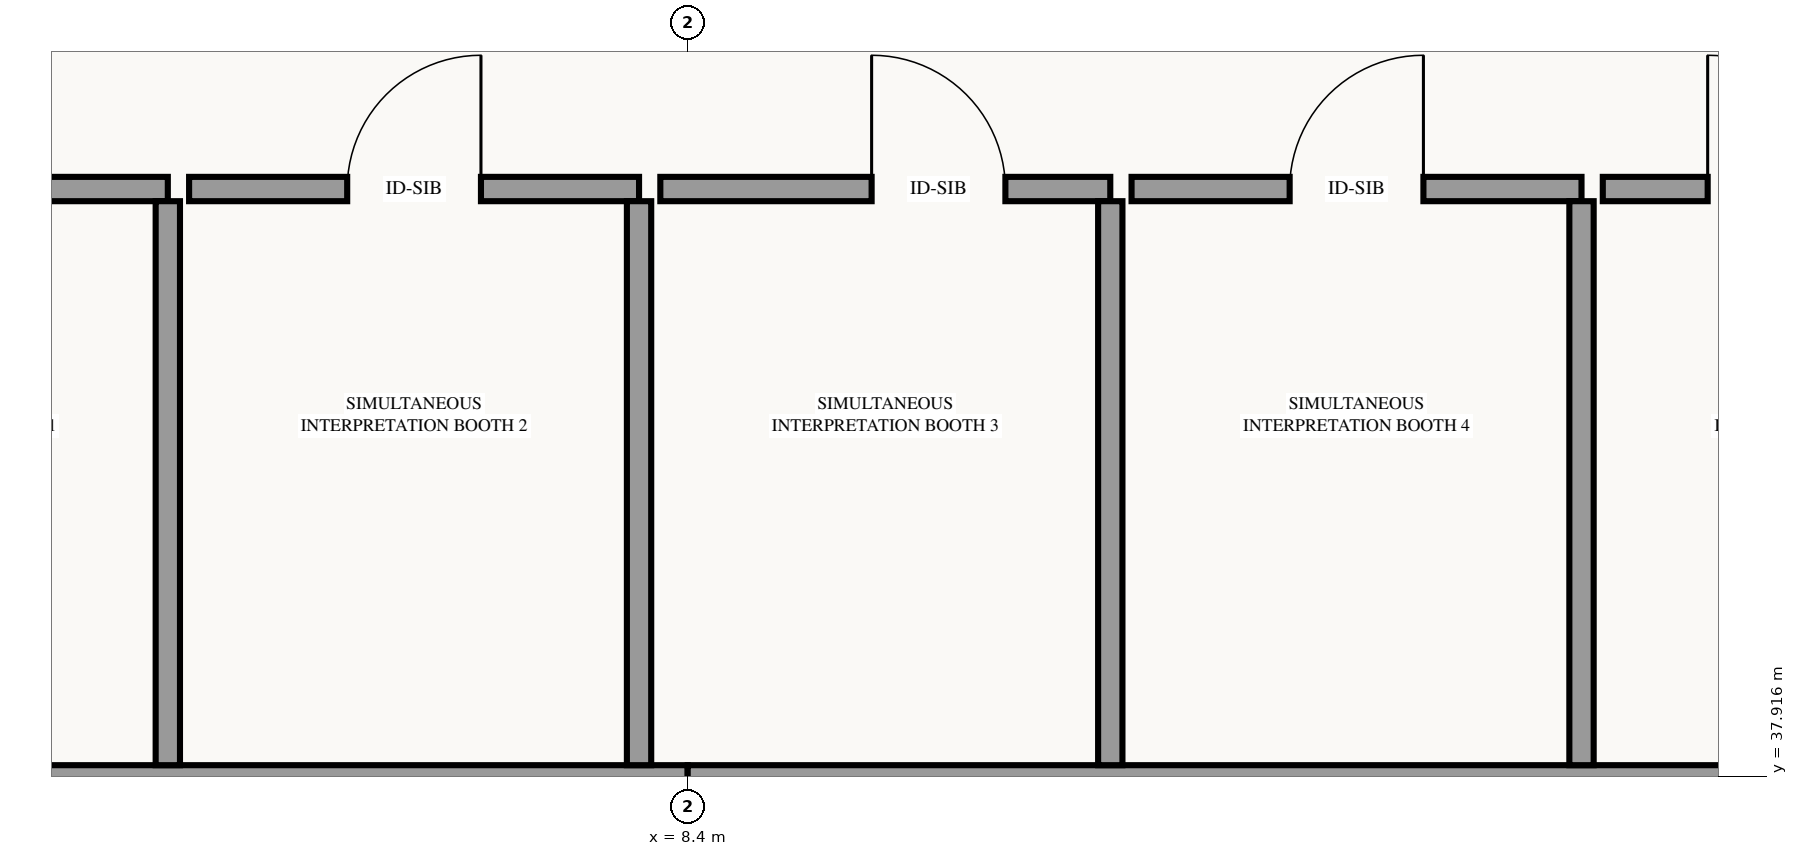
"""IFC4 building model, lengths in metres.
Left out: names, types, materials, properties, quantities, classifications, styles, units other than length and angle.
Written with IfcOpenShell. Run it as: python <this file> out.ifc"""

import sys

from ifc_helpers import new_model, si_unit, direction, frame, frame_2d, origin, origin_2d, place, context, subcontext, project, spatial, rectangle, extrude, element, fill, save


model = new_model("IFC4")
c1 = context("Model", 3, precision=1e-05, world=origin(), true_north=direction((0.0, 1.0)))
c2 = subcontext(c1, "Body", "Model", "MODEL_VIEW")
j1 = project(units=[si_unit("LENGTHUNIT", "METRE"), si_unit("PLANEANGLEUNIT", "RADIAN")], contexts=[c1])
p1 = place(None, origin())
s1 = spatial("IfcSite", under=j1, at=p1, CompositionType="ELEMENT")
p2 = place(p1, origin())
s2 = spatial("IfcBuilding", under=s1, at=p2, CompositionType="ELEMENT")
p3 = place(p2, frame((0.0, 0.0, 5.4)))
s3 = spatial("IfcBuildingStorey", under=s2, at=p3, CompositionType="ELEMENT", Elevation=5.4)
p4 = place(p3, frame((8.4, 37.8, 0.0), z_axis=(0.0, 0.0, 1.0), x_axis=(1.0, 0.0, 0.0)))
e1 = element("IfcColumn", 1, at=p4, inside=s3, PredefinedType="COLUMN", context=c2, shape_type="SweptSolid", body=[
    extrude(rectangle(XDim=0.75, YDim=0.75, at=origin_2d()), origin(), (0.0, 0.0, 1.0), 4.5),
])
p5 = place(p3, frame((0.0, 37.8, 0.0), z_axis=(0.0, 0.0, 1.0), x_axis=(1.0, 0.0, 0.0)))
e2 = element("IfcWall", 2, at=p5, inside=s3, PredefinedType="STANDARD", context=c2, shape_type="SweptSolid", body=[
    extrude(rectangle(XDim=8.4, YDim=0.38, at=frame_2d((4.2, 0.0))), origin(), (0.0, 0.0, 1.0), 3.993),
])
p6 = place(p3, frame((8.4, 37.8, 0.0), z_axis=(0.0, 0.0, 1.0), x_axis=(1.0, 0.0, 0.0)))
e3 = element("IfcWall", 3, at=p6, inside=s3, PredefinedType="STANDARD", context=c2, shape_type="SweptSolid", body=[
    extrude(rectangle(XDim=8.4, YDim=0.38, at=frame_2d((4.2, 0.0))), origin(), (0.0, 0.0, 1.0), 3.556),
])
p7 = place(p3, frame((2.02, 41.78, 0.0), z_axis=(0.0, 0.0, 1.0), x_axis=(1.0, 0.0, 0.0)))
e4 = element("IfcWall", 4, at=p7, inside=s3, PredefinedType="PARTITIONING", context=c2, shape_type="SweptSolid", body=[
    extrude(rectangle(XDim=2.96, YDim=0.16, at=frame_2d((1.48, 0.0))), origin(), (0.0, 0.0, 1.0), 4.235),
])
p8 = place(p7, frame((1.04, 0.0, 0.0)))
e5 = element("IfcOpeningElement", 5, at=p8, cuts=e4, PredefinedType="OPENING", context=c2, shape_type="SweptSolid", body=[
    extrude(rectangle(XDim=0.88, YDim=2.05, at=frame_2d((0.44, 1.025))), frame((0.0, 0.09, 0.0), z_axis=(0.0, -1.0, 0.0), x_axis=(1.0, 0.0, 0.0)), (0.0, 0.0, 1.0), 0.18),
])
p9 = place(p3, frame((4.98, 37.99, 0.0), z_axis=(0.0, 0.0, 1.0), x_axis=(0.0, 1.0, 0.0)))
e6 = element("IfcWall", 6, at=p9, inside=s3, PredefinedType="PARTITIONING", context=c2, shape_type="SweptSolid", body=[
    extrude(rectangle(XDim=3.71, YDim=0.16, at=frame_2d((1.855, 0.0))), origin(), (0.0, 0.0, 1.0), 4.235),
])
p10 = place(p3, frame((5.12, 41.78, 0.0), z_axis=(0.0, 0.0, 1.0), x_axis=(1.0, 0.0, 0.0)))
e7 = element("IfcWall", 7, at=p10, inside=s3, PredefinedType="PARTITIONING", context=c2, shape_type="SweptSolid", body=[
    extrude(rectangle(XDim=2.96, YDim=0.16, at=frame_2d((1.48, 0.0))), origin(), (0.0, 0.0, 1.0), 4.235),
])
p11 = place(p10, frame((1.04, 0.0, 0.0)))
e8 = element("IfcOpeningElement", 8, at=p11, cuts=e7, PredefinedType="OPENING", context=c2, shape_type="SweptSolid", body=[
    extrude(rectangle(XDim=0.88, YDim=2.05, at=frame_2d((0.44, 1.025))), frame((0.0, 0.09, 0.0), z_axis=(0.0, -1.0, 0.0), x_axis=(1.0, 0.0, 0.0)), (0.0, 0.0, 1.0), 0.18),
])
p12 = place(p3, frame((8.08, 37.99, 0.0), z_axis=(0.0, 0.0, 1.0), x_axis=(0.0, 1.0, 0.0)))
e9 = element("IfcWall", 9, at=p12, inside=s3, PredefinedType="PARTITIONING", context=c2, shape_type="SweptSolid", body=[
    extrude(rectangle(XDim=3.71, YDim=0.16, at=frame_2d((1.855, 0.0))), origin(), (0.0, 0.0, 1.0), 4.235),
])
p13 = place(p3, frame((8.22, 41.78, 0.0), z_axis=(0.0, 0.0, 1.0), x_axis=(1.0, 0.0, 0.0)))
e10 = element("IfcWall", 10, at=p13, inside=s3, PredefinedType="PARTITIONING", context=c2, shape_type="SweptSolid", body=[
    extrude(rectangle(XDim=2.96, YDim=0.16, at=frame_2d((1.48, 0.0))), origin(), (0.0, 0.0, 1.0), 4.235),
])
p14 = place(p13, frame((1.39, 0.0, 0.0)))
e11 = element("IfcOpeningElement", 11, at=p14, cuts=e10, PredefinedType="OPENING", context=c2, shape_type="SweptSolid", body=[
    extrude(rectangle(XDim=0.88, YDim=2.05, at=frame_2d((0.44, 1.025))), frame((0.0, 0.09, 0.0), z_axis=(0.0, -1.0, 0.0), x_axis=(1.0, 0.0, 0.0)), (0.0, 0.0, 1.0), 0.18),
])
p15 = place(p3, frame((11.18, 37.99, 0.0), z_axis=(0.0, 0.0, 1.0), x_axis=(0.0, 1.0, 0.0)))
e12 = element("IfcWall", 12, at=p15, inside=s3, PredefinedType="PARTITIONING", context=c2, shape_type="SweptSolid", body=[
    extrude(rectangle(XDim=3.71, YDim=0.16, at=frame_2d((1.855, 0.0))), origin(), (0.0, 0.0, 1.0), 4.235),
])
p16 = place(p3, frame((11.32, 41.78, 0.0), z_axis=(0.0, 0.0, 1.0), x_axis=(1.0, 0.0, 0.0)))
e13 = element("IfcWall", 13, at=p16, inside=s3, PredefinedType="PARTITIONING", context=c2, shape_type="SweptSolid", body=[
    extrude(rectangle(XDim=2.96, YDim=0.16, at=frame_2d((1.48, 0.0))), origin(), (0.0, 0.0, 1.0), 4.235),
])
p17 = place(p16, frame((1.04, 0.0, 0.0)))
e14 = element("IfcOpeningElement", 14, at=p17, cuts=e13, PredefinedType="OPENING", context=c2, shape_type="SweptSolid", body=[
    extrude(rectangle(XDim=0.88, YDim=2.05, at=frame_2d((0.44, 1.025))), frame((0.0, 0.09, 0.0), z_axis=(0.0, -1.0, 0.0), x_axis=(1.0, 0.0, 0.0)), (0.0, 0.0, 1.0), 0.18),
])
p18 = place(p3, frame((14.28, 37.99, 0.0), z_axis=(0.0, 0.0, 1.0), x_axis=(0.0, 1.0, 0.0)))
e15 = element("IfcWall", 15, at=p18, inside=s3, PredefinedType="PARTITIONING", context=c2, shape_type="SweptSolid", body=[
    extrude(rectangle(XDim=3.71, YDim=0.16, at=frame_2d((1.855, 0.0))), origin(), (0.0, 0.0, 1.0), 4.235),
])
p19 = place(p3, frame((14.42, 41.78, 0.0), z_axis=(0.0, 0.0, 1.0), x_axis=(1.0, 0.0, 0.0)))
e16 = element("IfcWall", 16, at=p19, inside=s3, PredefinedType="PARTITIONING", context=c2, shape_type="SweptSolid", body=[
    extrude(rectangle(XDim=2.96, YDim=0.16, at=frame_2d((1.48, 0.0))), origin(), (0.0, 0.0, 1.0), 4.235),
])
p20 = place(p19, frame((0.69, 0.0, 0.0)))
e17 = element("IfcOpeningElement", 17, at=p20, cuts=e16, PredefinedType="OPENING", context=c2, shape_type="SweptSolid", body=[
    extrude(rectangle(XDim=0.88, YDim=2.05, at=frame_2d((0.44, 1.025))), frame((0.0, 0.09, 0.0), z_axis=(0.0, -1.0, 0.0), x_axis=(1.0, 0.0, 0.0)), (0.0, 0.0, 1.0), 0.18),
])
p21 = place(p11, origin())
e18 = element("IfcDoor", 18, at=p21, inside=s3, OperationType="SINGLE_SWING_RIGHT", PredefinedType="DOOR", context=c2, shape_type="SweptSolid", body=[
    extrude(rectangle(XDim=0.88, YDim=2.05, at=frame_2d((0.44, 1.025))), frame((0.0, 0.025, 0.0), z_axis=(0.0, -1.0, 0.0), x_axis=(1.0, 0.0, 0.0)), (0.0, 0.0, 1.0), 0.05),
])
fill(e8, e18)
p22 = place(p14, origin())
e19 = element("IfcDoor", 19, at=p22, inside=s3, OperationType="SINGLE_SWING_LEFT", PredefinedType="DOOR", context=c2, shape_type="SweptSolid", body=[
    extrude(rectangle(XDim=0.88, YDim=2.05, at=frame_2d((0.44, 1.025))), frame((0.0, 0.025, 0.0), z_axis=(0.0, -1.0, 0.0), x_axis=(1.0, 0.0, 0.0)), (0.0, 0.0, 1.0), 0.05),
])
fill(e11, e19)
p23 = place(p17, origin())
e20 = element("IfcDoor", 20, at=p23, inside=s3, OperationType="SINGLE_SWING_RIGHT", PredefinedType="DOOR", context=c2, shape_type="SweptSolid", body=[
    extrude(rectangle(XDim=0.88, YDim=2.05, at=frame_2d((0.44, 1.025))), frame((0.0, 0.025, 0.0), z_axis=(0.0, -1.0, 0.0), x_axis=(1.0, 0.0, 0.0)), (0.0, 0.0, 1.0), 0.05),
])
fill(e14, e20)
p24 = place(p20, origin())
e21 = element("IfcDoor", 21, at=p24, inside=s3, OperationType="SINGLE_SWING_LEFT", PredefinedType="DOOR", context=c2, shape_type="SweptSolid", body=[
    extrude(rectangle(XDim=0.88, YDim=2.05, at=frame_2d((0.44, 1.025))), frame((0.0, 0.025, 0.0), z_axis=(0.0, -1.0, 0.0), x_axis=(1.0, 0.0, 0.0)), (0.0, 0.0, 1.0), 0.05),
])
fill(e17, e21)
save(model, sys.argv[1])
